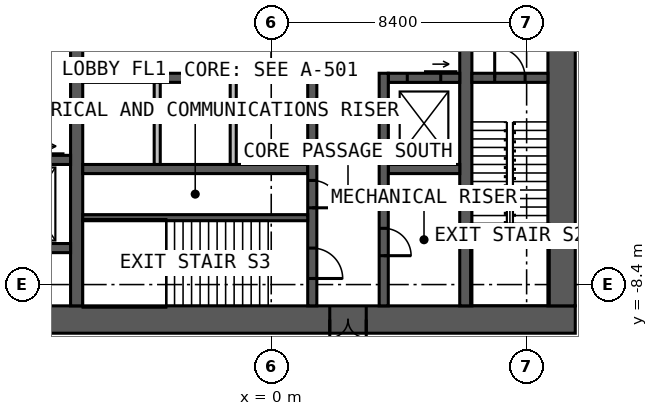
"""IFC4 building model, lengths in metres.
Left out: names, types, materials, properties, quantities, classifications, styles, units other than length and angle.
Written with IfcOpenShell. Run it as: python <this file> out.ifc"""

import sys

from ifc_helpers import new_model, si_unit, direction, frame, frame_2d, origin, place, context, subcontext, project, spatial, rectangle, extrude, element, fill, save


model = new_model("IFC4")
c1 = context("Model", 3, precision=1e-05, world=origin(), true_north=direction((0.0, 1.0)))
c2 = subcontext(c1, "Body", "Model", "MODEL_VIEW")
j1 = project(units=[si_unit("LENGTHUNIT", "METRE"), si_unit("PLANEANGLEUNIT", "RADIAN")], contexts=[c1])
p1 = place(None, origin())
s1 = spatial("IfcSite", under=j1, at=p1, CompositionType="ELEMENT")
p2 = place(p1, origin())
s2 = spatial("IfcBuilding", under=s1, at=p2, CompositionType="ELEMENT")
p3 = place(p2, frame((0.0, 0.0, -13.5)))
s3 = spatial("IfcBuildingStorey", under=s2, at=p3, CompositionType="ELEMENT", Elevation=-13.5)
p4 = place(p3, frame((10.0, -9.55, 0.0), z_axis=(0.0, 0.0, 1.0), x_axis=(-1.0, 0.0, 0.0)))
e1 = element("IfcWall", 1, at=p4, inside=s3, PredefinedType="SOLIDWALL", context=c2, shape_type="SweptSolid", body=[
    extrude(rectangle(XDim=20.0, YDim=0.9, at=frame_2d((10.0, 0.0))), origin(), (0.0, 0.0, 1.0), 4.5),
])
p5 = place(p4, frame((6.875, 0.0, 0.0)))
e2 = element("IfcOpeningElement", 2, at=p5, cuts=e1, PredefinedType="OPENING", context=c2, shape_type="SweptSolid", body=[
    extrude(rectangle(XDim=1.2, YDim=2.2, at=frame_2d((0.6, 1.1))), frame((0.0, 0.46, 0.0), z_axis=(0.0, -1.0, 0.0), x_axis=(1.0, 0.0, 0.0)), (0.0, 0.0, 1.0), 0.92),
])
p6 = place(p3, frame((9.55, -9.1, 0.0), z_axis=(0.0, 0.0, 1.0), x_axis=(0.0, 1.0, 0.0)))
e3 = element("IfcWall", 3, at=p6, inside=s3, PredefinedType="SOLIDWALL", context=c2, shape_type="SweptSolid", body=[
    extrude(rectangle(XDim=18.2, YDim=0.9, at=frame_2d((9.1, 0.0))), origin(), (0.0, 0.0, 1.0), 4.5),
])
p7 = place(p3, frame((-6.4, -9.1, 0.0), z_axis=(0.0, 0.0, 1.0), x_axis=(0.0, 1.0, 0.0)))
e4 = element("IfcWall", 4, at=p7, inside=s3, PredefinedType="SOLIDWALL", context=c2, shape_type="SweptSolid", body=[
    extrude(rectangle(XDim=18.2, YDim=0.4, at=frame_2d((9.1, 0.0))), origin(), (0.0, 0.0, 1.0), 4.5),
])
p8 = place(p7, frame((8.6, 0.0, 0.0)))
e5 = element("IfcOpeningElement", 5, at=p8, cuts=e4, PredefinedType="OPENING", context=c2, shape_type="SweptSolid", body=[
    extrude(rectangle(XDim=1.0, YDim=2.2, at=frame_2d((0.5, 1.1))), frame((0.0, 0.21, 0.0), z_axis=(0.0, -1.0, 0.0), x_axis=(1.0, 0.0, 0.0)), (0.0, 0.0, 1.0), 0.42),
])
p9 = place(p3, frame((6.4, 9.1, 0.0), z_axis=(0.0, 0.0, 1.0), x_axis=(0.0, -1.0, 0.0)))
e6 = element("IfcWall", 6, at=p9, inside=s3, PredefinedType="SOLIDWALL", context=c2, shape_type="SweptSolid", body=[
    extrude(rectangle(XDim=18.2, YDim=0.4, at=frame_2d((9.1, 0.0))), origin(), (0.0, 0.0, 1.0), 4.5),
])
p10 = place(p9, frame((8.6, 0.0, 0.0)))
e7 = element("IfcOpeningElement", 7, at=p10, cuts=e6, PredefinedType="OPENING", context=c2, shape_type="SweptSolid", body=[
    extrude(rectangle(XDim=1.0, YDim=2.2, at=frame_2d((0.5, 1.1))), frame((0.0, 0.21, 0.0), z_axis=(0.0, -1.0, 0.0), x_axis=(1.0, 0.0, 0.0)), (0.0, 0.0, 1.0), 0.42),
])
p11 = place(p3, frame((-6.2, -1.6, 0.0), z_axis=(0.0, 0.0, 1.0), x_axis=(1.0, 0.0, 0.0)))
e8 = element("IfcWall", 8, at=p11, inside=s3, PredefinedType="SOLIDWALL", context=c2, shape_type="SweptSolid", body=[
    extrude(rectangle(XDim=7.4, YDim=0.3, at=frame_2d((3.7, 0.0))), origin(), (0.0, 0.0, 1.0), 4.5),
])
p12 = place(p3, frame((3.85, -1.6, 0.0), z_axis=(0.0, 0.0, 1.0), x_axis=(1.0, 0.0, 0.0)))
e9 = element("IfcWall", 9, at=p12, inside=s3, PredefinedType="SOLIDWALL", context=c2, shape_type="SweptSolid", body=[
    extrude(rectangle(XDim=2.35, YDim=0.3, at=frame_2d((1.175, 0.0))), origin(), (0.0, 0.0, 1.0), 4.5),
])
p13 = place(p12, frame((0.625, 0.0, 0.0)))
e10 = element("IfcOpeningElement", 10, at=p13, cuts=e9, PredefinedType="OPENING", context=c2, shape_type="SweptSolid", body=[
    extrude(rectangle(XDim=1.1, YDim=2.2, at=frame_2d((0.55, 1.1))), frame((0.0, 0.16, 0.0), z_axis=(0.0, -1.0, 0.0), x_axis=(1.0, 0.0, 0.0)), (0.0, 0.0, 1.0), 0.32),
])
p14 = place(p3, frame((-6.2, -4.6, 0.0), z_axis=(0.0, 0.0, 1.0), x_axis=(1.0, 0.0, 0.0)))
e11 = element("IfcWall", 11, at=p14, inside=s3, PredefinedType="SOLIDWALL", context=c2, shape_type="SweptSolid", body=[
    extrude(rectangle(XDim=7.4, YDim=0.3, at=frame_2d((3.7, 0.0))), origin(), (0.0, 0.0, 1.0), 4.5),
])
p15 = place(p3, frame((3.85, -4.6, 0.0), z_axis=(0.0, 0.0, 1.0), x_axis=(1.0, 0.0, 0.0)))
e12 = element("IfcWall", 12, at=p15, inside=s3, PredefinedType="SOLIDWALL", context=c2, shape_type="SweptSolid", body=[
    extrude(rectangle(XDim=2.35, YDim=0.3, at=frame_2d((1.175, 0.0))), origin(), (0.0, 0.0, 1.0), 4.5),
])
p16 = place(p3, frame((1.35, -1.45, 0.0), z_axis=(0.0, 0.0, 1.0), x_axis=(0.0, -1.0, 0.0)))
e13 = element("IfcWall", 13, at=p16, inside=s3, PredefinedType="SOLIDWALL", context=c2, shape_type="SweptSolid", body=[
    extrude(rectangle(XDim=7.65, YDim=0.3, at=frame_2d((3.825, 0.0))), origin(), (0.0, 0.0, 1.0), 4.5),
])
p17 = place(p16, frame((5.75, 0.0, 0.0)))
e14 = element("IfcOpeningElement", 14, at=p17, cuts=e13, PredefinedType="OPENING", context=c2, shape_type="SweptSolid", body=[
    extrude(rectangle(XDim=1.0, YDim=2.2, at=frame_2d((0.5, 1.1))), frame((0.0, 0.16, 0.0), z_axis=(0.0, -1.0, 0.0), x_axis=(1.0, 0.0, 0.0)), (0.0, 0.0, 1.0), 0.32),
])
p18 = place(p16, frame((3.525, 0.0, 0.0)))
e15 = element("IfcOpeningElement", 15, at=p18, cuts=e13, PredefinedType="OPENING", context=c2, shape_type="SweptSolid", body=[
    extrude(rectangle(XDim=0.9, YDim=2.2, at=frame_2d((0.45, 1.1))), frame((0.0, 0.16, 0.0), z_axis=(0.0, -1.0, 0.0), x_axis=(1.0, 0.0, 0.0)), (0.0, 0.0, 1.0), 0.32),
])
p19 = place(p3, frame((3.7, -1.45, 0.0), z_axis=(0.0, 0.0, 1.0), x_axis=(0.0, -1.0, 0.0)))
e16 = element("IfcWall", 16, at=p19, inside=s3, PredefinedType="SOLIDWALL", context=c2, shape_type="SweptSolid", body=[
    extrude(rectangle(XDim=7.65, YDim=0.3, at=frame_2d((3.825, 0.0))), origin(), (0.0, 0.0, 1.0), 4.5),
])
p20 = place(p19, frame((5.1, 0.0, 0.0)))
e17 = element("IfcOpeningElement", 17, at=p20, cuts=e16, PredefinedType="OPENING", context=c2, shape_type="SweptSolid", body=[
    extrude(rectangle(XDim=0.9, YDim=2.2, at=frame_2d((0.45, 1.1))), frame((0.0, 0.16, 0.0), z_axis=(0.0, -1.0, 0.0), x_axis=(1.0, 0.0, 0.0)), (0.0, 0.0, 1.0), 0.32),
])
p21 = place(p3, frame((-6.2, -6.2, 0.0), z_axis=(0.0, 0.0, 1.0), x_axis=(1.0, 0.0, 0.0)))
e18 = element("IfcWall", 18, at=p21, inside=s3, PredefinedType="SOLIDWALL", context=c2, shape_type="SweptSolid", body=[
    extrude(rectangle(XDim=7.4, YDim=0.2, at=frame_2d((3.7, 0.0))), origin(), (0.0, 0.0, 1.0), 4.5),
])
p22 = place(p3, frame((6.6, -1.6, 0.0), z_axis=(0.0, 0.0, 1.0), x_axis=(1.0, 0.0, 0.0)))
e19 = element("IfcWall", 19, at=p22, inside=s3, PredefinedType="SOLIDWALL", context=c2, shape_type="SweptSolid", body=[
    extrude(rectangle(XDim=2.5, YDim=0.3, at=frame_2d((1.25, 0.0))), origin(), (0.0, 0.0, 1.0), 4.5),
])
p23 = place(p22, frame((0.75, 0.0, 0.0)))
e20 = element("IfcOpeningElement", 20, at=p23, cuts=e19, PredefinedType="OPENING", context=c2, shape_type="SweptSolid", body=[
    extrude(rectangle(XDim=1.0, YDim=2.2, at=frame_2d((0.5, 1.1))), frame((0.0, 0.16, 0.0), z_axis=(0.0, -1.0, 0.0), x_axis=(1.0, 0.0, 0.0)), (0.0, 0.0, 1.0), 0.32),
])
p24 = place(p3, frame((-9.1, -4.3, 0.0), z_axis=(0.0, 0.0, 1.0), x_axis=(1.0, 0.0, 0.0)))
e21 = element("IfcWall", 21, at=p24, inside=s3, PredefinedType="SOLIDWALL", context=c2, shape_type="SweptSolid", body=[
    extrude(rectangle(XDim=2.5, YDim=0.3, at=frame_2d((1.25, 0.0))), origin(), (0.0, 0.0, 1.0), 4.5),
])
p25 = place(p24, frame((0.65, 0.0, 0.0)))
e22 = element("IfcOpeningElement", 22, at=p25, cuts=e21, PredefinedType="OPENING", context=c2, shape_type="SweptSolid", body=[
    extrude(rectangle(XDim=1.1, YDim=2.2, at=frame_2d((0.55, 1.1))), frame((0.0, 0.16, 0.0), z_axis=(0.0, -1.0, 0.0), x_axis=(1.0, 0.0, 0.0)), (0.0, 0.0, 1.0), 0.32),
])
p26 = place(p3, frame((-9.1, -7.2, 0.0), z_axis=(0.0, 0.0, 1.0), x_axis=(1.0, 0.0, 0.0)))
e23 = element("IfcWall", 23, at=p26, inside=s3, PredefinedType="SOLIDWALL", context=c2, shape_type="SweptSolid", body=[
    extrude(rectangle(XDim=2.5, YDim=0.3, at=frame_2d((1.25, 0.0))), origin(), (0.0, 0.0, 1.0), 4.5),
])
for number, where, z_axis, x_axis in (
    (24, (-3.75, -1.75, 0.0), (0.0, 0.0, 1.0), (0.0, -1.0, 0.0)),
    (25, (-1.25, -1.75, 0.0), (0.0, 0.0, 1.0), (0.0, -1.0, 0.0)),
):
    element("IfcWall", number, at=place(p3, frame(where, z_axis=z_axis, x_axis=x_axis)), inside=s3, PredefinedType="SOLIDWALL", context=c2, shape_type="SweptSolid", body=[
        extrude(rectangle(XDim=2.7, YDim=0.2, at=frame_2d((1.35, 0.0))), origin(), (0.0, 0.0, 1.0), 4.25),
    ])
p27 = place(p5, origin())
e26 = element("IfcDoor", 26, at=p27, inside=s3, OperationType="DOUBLE_DOOR_SINGLE_SWING", PredefinedType="DOOR", context=c2, shape_type="SweptSolid", body=[
    extrude(rectangle(XDim=1.2, YDim=2.2, at=frame_2d((0.6, 1.1))), frame((0.0, 0.025, 0.0), z_axis=(0.0, -1.0, 0.0), x_axis=(1.0, 0.0, 0.0)), (0.0, 0.0, 1.0), 0.05),
])
fill(e2, e26)
p28 = place(p23, origin())
e27 = element("IfcDoor", 27, at=p28, inside=s3, OperationType="SINGLE_SWING_LEFT", PredefinedType="DOOR", context=c2, shape_type="SweptSolid", body=[
    extrude(rectangle(XDim=1.0, YDim=2.2, at=frame_2d((0.5, 1.1))), frame((0.0, 0.025, 0.0), z_axis=(0.0, -1.0, 0.0), x_axis=(1.0, 0.0, 0.0)), (0.0, 0.0, 1.0), 0.05),
])
fill(e20, e27)
p29 = place(p17, origin())
e28 = element("IfcDoor", 28, at=p29, inside=s3, OperationType="SINGLE_SWING_RIGHT", PredefinedType="DOOR", context=c2, shape_type="SweptSolid", body=[
    extrude(rectangle(XDim=1.0, YDim=2.2, at=frame_2d((0.5, 1.1))), frame((0.0, 0.025, 0.0), z_axis=(0.0, -1.0, 0.0), x_axis=(1.0, 0.0, 0.0)), (0.0, 0.0, 1.0), 0.05),
])
fill(e14, e28)
p30 = place(p18, origin())
e29 = element("IfcDoor", 29, at=p30, inside=s3, OperationType="SINGLE_SWING_RIGHT", PredefinedType="DOOR", context=c2, shape_type="SweptSolid", body=[
    extrude(rectangle(XDim=0.9, YDim=2.2, at=frame_2d((0.45, 1.1))), frame((0.0, 0.025, 0.0), z_axis=(0.0, -1.0, 0.0), x_axis=(1.0, 0.0, 0.0)), (0.0, 0.0, 1.0), 0.05),
])
fill(e15, e29)
p31 = place(p20, origin())
e30 = element("IfcDoor", 30, at=p31, inside=s3, OperationType="SINGLE_SWING_RIGHT", PredefinedType="DOOR", context=c2, shape_type="SweptSolid", body=[
    extrude(rectangle(XDim=0.9, YDim=2.2, at=frame_2d((0.45, 1.1))), frame((0.0, 0.025, 0.0), z_axis=(0.0, -1.0, 0.0), x_axis=(1.0, 0.0, 0.0)), (0.0, 0.0, 1.0), 0.05),
])
fill(e17, e30)
p32 = place(p13, origin())
e31 = element("IfcDoor", 31, at=p32, inside=s3, OperationType="SLIDING_TO_LEFT", PredefinedType="DOOR", context=c2, shape_type="SweptSolid", body=[
    extrude(rectangle(XDim=1.1, YDim=2.2, at=frame_2d((0.55, 1.1))), frame((0.0, 0.025, 0.0), z_axis=(0.0, -1.0, 0.0), x_axis=(1.0, 0.0, 0.0)), (0.0, 0.0, 1.0), 0.05),
])
fill(e10, e31)
save(model, sys.argv[1])
